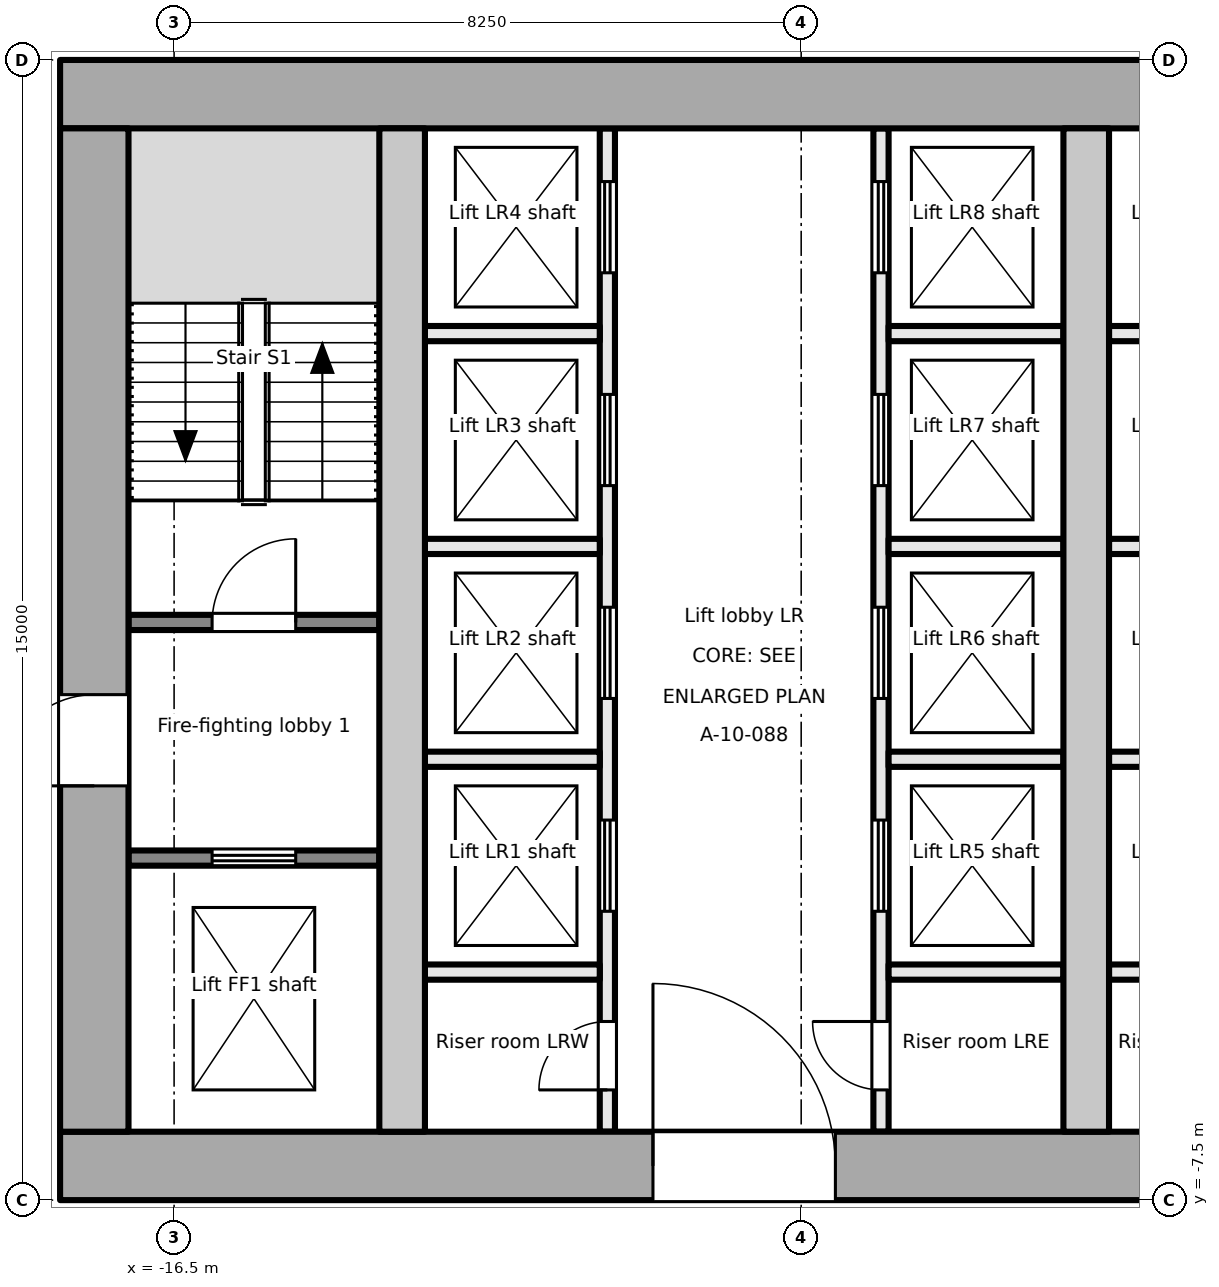
"""IFC4 building model, lengths in metres.
Left out: names, types, materials, properties, quantities, classifications, styles, units other than length and angle.
Written with IfcOpenShell. Run it as: python <this file> out.ifc"""

import sys

from ifc_helpers import new_model, si_unit, direction, frame, frame_2d, origin, place, context, subcontext, project, spatial, rectangle, extrude, element, fill, save


model = new_model("IFC4")
c1 = context("Model", 3, precision=1e-05, world=origin(), true_north=direction((0.0, 1.0)))
c2 = subcontext(c1, "Body", "Model", "MODEL_VIEW")
j1 = project(units=[si_unit("LENGTHUNIT", "METRE"), si_unit("PLANEANGLEUNIT", "RADIAN")], contexts=[c1])
p1 = place(None, origin())
s1 = spatial("IfcSite", under=j1, at=p1, CompositionType="ELEMENT")
p2 = place(p1, origin())
s2 = spatial("IfcBuilding", under=s1, at=p2, CompositionType="ELEMENT")
p3 = place(p2, frame((0.0, 0.0, 48.8)))
s3 = spatial("IfcBuildingStorey", under=s2, at=p3, CompositionType="ELEMENT", Elevation=48.8)
p4 = place(p3, frame((-18.0, -7.05, -0.2), z_axis=(0.0, 0.0, 1.0), x_axis=(1.0, 0.0, 0.0)))
e1 = element("IfcWall", 1, at=p4, inside=s3, PredefinedType="SHEAR", context=c2, shape_type="SweptSolid", body=[
    extrude(rectangle(XDim=36.0, YDim=0.9, at=frame_2d((18.0, 0.0))), origin(), (0.0, 0.0, 1.0), 4.1),
])
p5 = place(p4, frame((7.8, 0.0, 0.2)))
e2 = element("IfcOpeningElement", 2, at=p5, cuts=e1, PredefinedType="OPENING", context=c2, shape_type="SweptSolid", body=[
    extrude(rectangle(XDim=2.4, YDim=2.1, at=frame_2d((1.2, 1.05))), frame((0.0, 0.46, 0.0), z_axis=(0.0, -1.0, 0.0), x_axis=(1.0, 0.0, 0.0)), (0.0, 0.0, 1.0), 0.921),
])
p6 = place(p4, frame((17.4, 0.0, 0.2)))
e3 = element("IfcOpeningElement", 3, at=p6, cuts=e1, PredefinedType="OPENING", context=c2, shape_type="SweptSolid", body=[
    extrude(rectangle(XDim=1.2, YDim=2.1, at=frame_2d((0.6, 1.05))), frame((0.0, 0.46, 0.0), z_axis=(0.0, -1.0, 0.0), x_axis=(1.0, 0.0, 0.0)), (0.0, 0.0, 1.0), 0.921),
])
p7 = place(p4, frame((26.1, 0.0, 0.2)))
e4 = element("IfcOpeningElement", 4, at=p7, cuts=e1, PredefinedType="OPENING", context=c2, shape_type="SweptSolid", body=[
    extrude(rectangle(XDim=2.4, YDim=2.1, at=frame_2d((1.2, 1.05))), frame((0.0, 0.46, 0.0), z_axis=(0.0, -1.0, 0.0), x_axis=(1.0, 0.0, 0.0)), (0.0, 0.0, 1.0), 0.921),
])
p8 = place(p3, frame((-18.0, 7.05, -0.2), z_axis=(0.0, 0.0, 1.0), x_axis=(1.0, 0.0, 0.0)))
e5 = element("IfcWall", 5, at=p8, inside=s3, PredefinedType="SHEAR", context=c2, shape_type="SweptSolid", body=[
    extrude(rectangle(XDim=36.0, YDim=0.9, at=frame_2d((18.0, 0.0))), origin(), (0.0, 0.0, 1.0), 4.1),
])
p9 = place(p3, frame((-17.55, -6.6, -0.2), z_axis=(0.0, 0.0, 1.0), x_axis=(0.0, 1.0, 0.0)))
e6 = element("IfcWall", 6, at=p9, inside=s3, PredefinedType="SHEAR", context=c2, shape_type="SweptSolid", body=[
    extrude(rectangle(XDim=13.2, YDim=0.9, at=frame_2d((6.6, 0.0))), origin(), (0.0, 0.0, 1.0), 4.1),
])
p10 = place(p9, frame((4.55, 0.0, 0.2)))
e7 = element("IfcOpeningElement", 7, at=p10, cuts=e6, PredefinedType="OPENING", context=c2, shape_type="SweptSolid", body=[
    extrude(rectangle(XDim=1.2, YDim=2.1, at=frame_2d((0.6, 1.05))), frame((0.0, 0.46, 0.0), z_axis=(0.0, -1.0, 0.0), x_axis=(1.0, 0.0, 0.0)), (0.0, 0.0, 1.0), 0.921),
])
for number, where, z_axis, x_axis in (
    (8, (-13.5, -6.6, -0.2), (0.0, 0.0, 1.0), (0.0, 1.0, 0.0)),
    (9, (-4.5, -6.6, -0.2), (0.0, 0.0, 1.0), (0.0, 1.0, 0.0)),
):
    element("IfcWall", number, at=place(p3, frame(where, z_axis=z_axis, x_axis=x_axis)), inside=s3, PredefinedType="SHEAR", context=c2, shape_type="SweptSolid", body=[
        extrude(rectangle(XDim=13.2, YDim=0.6, at=frame_2d((6.6, 0.0))), origin(), (0.0, 0.0, 1.0), 4.1),
    ])
p11 = place(p3, frame((-17.1, -3.0, 0.0), z_axis=(0.0, 0.0, 1.0), x_axis=(1.0, 0.0, 0.0)))
e10 = element("IfcWall", 10, at=p11, inside=s3, PredefinedType="PARTITIONING", context=c2, shape_type="SweptSolid", body=[
    extrude(rectangle(XDim=3.3, YDim=0.2, at=frame_2d((1.65, 0.0))), origin(), (0.0, 0.0, 1.0), 3.9),
])
p12 = place(p11, frame((1.1, 0.0, 0.0)))
e11 = element("IfcOpeningElement", 11, at=p12, cuts=e10, PredefinedType="OPENING", context=c2, shape_type="SweptSolid", body=[
    extrude(rectangle(XDim=1.1, YDim=2.1, at=frame_2d((0.55, 1.05))), frame((0.0, 0.111, 0.0), z_axis=(0.0, -1.0, 0.0), x_axis=(1.0, 0.0, 0.0)), (0.0, 0.0, 1.0), 0.221),
])
p13 = place(p3, frame((-17.1, 0.1, 0.0), z_axis=(0.0, 0.0, 1.0), x_axis=(1.0, 0.0, 0.0)))
e12 = element("IfcWall", 12, at=p13, inside=s3, PredefinedType="PARTITIONING", context=c2, shape_type="SweptSolid", body=[
    extrude(rectangle(XDim=3.3, YDim=0.2, at=frame_2d((1.65, 0.0))), origin(), (0.0, 0.0, 1.0), 3.9),
])
p14 = place(p13, frame((1.1, 0.0, 0.0)))
e13 = element("IfcOpeningElement", 13, at=p14, cuts=e12, PredefinedType="OPENING", context=c2, shape_type="SweptSolid", body=[
    extrude(rectangle(XDim=1.1, YDim=2.1, at=frame_2d((0.55, 1.05))), frame((0.0, 0.111, 0.0), z_axis=(0.0, -1.0, 0.0), x_axis=(1.0, 0.0, 0.0)), (0.0, 0.0, 1.0), 0.221),
])
p15 = place(p3, frame((-10.8, -6.6, 0.0), z_axis=(0.0, 0.0, 1.0), x_axis=(0.0, 1.0, 0.0)))
e14 = element("IfcWall", 14, at=p15, inside=s3, PredefinedType="PARTITIONING", context=c2, shape_type="SweptSolid", body=[
    extrude(rectangle(XDim=13.2, YDim=0.2, at=frame_2d((6.6, 0.0))), origin(), (0.0, 0.0, 1.0), 3.9),
])
p16 = place(p15, frame((0.55, 0.0, 0.0)))
e15 = element("IfcOpeningElement", 15, at=p16, cuts=e14, PredefinedType="OPENING", context=c2, shape_type="SweptSolid", body=[
    extrude(rectangle(XDim=0.9, YDim=2.1, at=frame_2d((0.45, 1.05))), frame((0.0, 0.111, 0.0), z_axis=(0.0, -1.0, 0.0), x_axis=(1.0, 0.0, 0.0)), (0.0, 0.0, 1.0), 0.221),
])
p17 = place(p15, frame((2.9, 0.0, 0.0)))
e16 = element("IfcOpeningElement", 16, at=p17, cuts=e14, PredefinedType="OPENING", context=c2, shape_type="SweptSolid", body=[
    extrude(rectangle(XDim=1.2, YDim=2.1, at=frame_2d((0.6, 1.05))), frame((0.0, 0.111, 0.0), z_axis=(0.0, -1.0, 0.0), x_axis=(1.0, 0.0, 0.0)), (0.0, 0.0, 1.0), 0.221),
])
p18 = place(p15, frame((5.7, 0.0, 0.0)))
e17 = element("IfcOpeningElement", 17, at=p18, cuts=e14, PredefinedType="OPENING", context=c2, shape_type="SweptSolid", body=[
    extrude(rectangle(XDim=1.2, YDim=2.1, at=frame_2d((0.6, 1.05))), frame((0.0, 0.111, 0.0), z_axis=(0.0, -1.0, 0.0), x_axis=(1.0, 0.0, 0.0)), (0.0, 0.0, 1.0), 0.221),
])
p19 = place(p15, frame((8.5, 0.0, 0.0)))
e18 = element("IfcOpeningElement", 18, at=p19, cuts=e14, PredefinedType="OPENING", context=c2, shape_type="SweptSolid", body=[
    extrude(rectangle(XDim=1.2, YDim=2.1, at=frame_2d((0.6, 1.05))), frame((0.0, 0.111, 0.0), z_axis=(0.0, -1.0, 0.0), x_axis=(1.0, 0.0, 0.0)), (0.0, 0.0, 1.0), 0.221),
])
p20 = place(p15, frame((11.3, 0.0, 0.0)))
e19 = element("IfcOpeningElement", 19, at=p20, cuts=e14, PredefinedType="OPENING", context=c2, shape_type="SweptSolid", body=[
    extrude(rectangle(XDim=1.2, YDim=2.1, at=frame_2d((0.6, 1.05))), frame((0.0, 0.111, 0.0), z_axis=(0.0, -1.0, 0.0), x_axis=(1.0, 0.0, 0.0)), (0.0, 0.0, 1.0), 0.221),
])
p21 = place(p3, frame((-7.2, -6.6, 0.0), z_axis=(0.0, 0.0, 1.0), x_axis=(0.0, 1.0, 0.0)))
e20 = element("IfcWall", 20, at=p21, inside=s3, PredefinedType="PARTITIONING", context=c2, shape_type="SweptSolid", body=[
    extrude(rectangle(XDim=13.2, YDim=0.2, at=frame_2d((6.6, 0.0))), origin(), (0.0, 0.0, 1.0), 3.9),
])
p22 = place(p21, frame((0.55, 0.0, 0.0)))
e21 = element("IfcOpeningElement", 21, at=p22, cuts=e20, PredefinedType="OPENING", context=c2, shape_type="SweptSolid", body=[
    extrude(rectangle(XDim=0.9, YDim=2.1, at=frame_2d((0.45, 1.05))), frame((0.0, 0.111, 0.0), z_axis=(0.0, -1.0, 0.0), x_axis=(1.0, 0.0, 0.0)), (0.0, 0.0, 1.0), 0.221),
])
p23 = place(p21, frame((2.9, 0.0, 0.0)))
e22 = element("IfcOpeningElement", 22, at=p23, cuts=e20, PredefinedType="OPENING", context=c2, shape_type="SweptSolid", body=[
    extrude(rectangle(XDim=1.2, YDim=2.1, at=frame_2d((0.6, 1.05))), frame((0.0, 0.111, 0.0), z_axis=(0.0, -1.0, 0.0), x_axis=(1.0, 0.0, 0.0)), (0.0, 0.0, 1.0), 0.221),
])
p24 = place(p21, frame((5.7, 0.0, 0.0)))
e23 = element("IfcOpeningElement", 23, at=p24, cuts=e20, PredefinedType="OPENING", context=c2, shape_type="SweptSolid", body=[
    extrude(rectangle(XDim=1.2, YDim=2.1, at=frame_2d((0.6, 1.05))), frame((0.0, 0.111, 0.0), z_axis=(0.0, -1.0, 0.0), x_axis=(1.0, 0.0, 0.0)), (0.0, 0.0, 1.0), 0.221),
])
p25 = place(p21, frame((8.5, 0.0, 0.0)))
e24 = element("IfcOpeningElement", 24, at=p25, cuts=e20, PredefinedType="OPENING", context=c2, shape_type="SweptSolid", body=[
    extrude(rectangle(XDim=1.2, YDim=2.1, at=frame_2d((0.6, 1.05))), frame((0.0, 0.111, 0.0), z_axis=(0.0, -1.0, 0.0), x_axis=(1.0, 0.0, 0.0)), (0.0, 0.0, 1.0), 0.221),
])
p26 = place(p21, frame((11.3, 0.0, 0.0)))
e25 = element("IfcOpeningElement", 25, at=p26, cuts=e20, PredefinedType="OPENING", context=c2, shape_type="SweptSolid", body=[
    extrude(rectangle(XDim=1.2, YDim=2.1, at=frame_2d((0.6, 1.05))), frame((0.0, 0.111, 0.0), z_axis=(0.0, -1.0, 0.0), x_axis=(1.0, 0.0, 0.0)), (0.0, 0.0, 1.0), 0.221),
])
for number, where, z_axis, x_axis in (
    (26, (-13.2, -1.7, 0.0), (0.0, 0.0, 1.0), (1.0, 0.0, 0.0)),
    (27, (-13.2, 1.1, 0.0), (0.0, 0.0, 1.0), (1.0, 0.0, 0.0)),
    (28, (-13.2, 3.9, 0.0), (0.0, 0.0, 1.0), (1.0, 0.0, 0.0)),
    (29, (-13.2, -4.5, 0.0), (0.0, 0.0, 1.0), (1.0, 0.0, 0.0)),
    (30, (-7.1, -1.7, 0.0), (0.0, 0.0, 1.0), (1.0, 0.0, 0.0)),
    (31, (-7.1, 1.1, 0.0), (0.0, 0.0, 1.0), (1.0, 0.0, 0.0)),
    (32, (-7.1, 3.9, 0.0), (0.0, 0.0, 1.0), (1.0, 0.0, 0.0)),
    (33, (-7.1, -4.5, 0.0), (0.0, 0.0, 1.0), (1.0, 0.0, 0.0)),
    (34, (-4.2, -1.7, 0.0), (0.0, 0.0, 1.0), (1.0, 0.0, 0.0)),
    (35, (-4.2, 1.1, 0.0), (0.0, 0.0, 1.0), (1.0, 0.0, 0.0)),
    (36, (-4.2, 3.9, 0.0), (0.0, 0.0, 1.0), (1.0, 0.0, 0.0)),
    (37, (-4.2, -4.5, 0.0), (0.0, 0.0, 1.0), (1.0, 0.0, 0.0)),
):
    element("IfcWall", number, at=place(p3, frame(where, z_axis=z_axis, x_axis=x_axis)), inside=s3, PredefinedType="PARTITIONING", context=c2, shape_type="SweptSolid", body=[
        extrude(rectangle(XDim=2.3, YDim=0.2, at=frame_2d((1.15, 0.0))), origin(), (0.0, 0.0, 1.0), 3.9),
    ])
p27 = place(p12, origin())
e38 = element("IfcDoor", 38, at=p27, inside=s3, OperationType="DOUBLE_DOOR_SLIDING", PredefinedType="DOOR", context=c2, shape_type="SweptSolid", body=[
    extrude(rectangle(XDim=1.1, YDim=2.1, at=frame_2d((0.55, 1.05))), frame((0.0, 0.025, 0.0), z_axis=(0.0, -1.0, 0.0), x_axis=(1.0, 0.0, 0.0)), (0.0, 0.0, 1.0), 0.05),
])
fill(e11, e38)
p28 = place(p10, origin())
e39 = element("IfcDoor", 39, at=p28, inside=s3, OperationType="SINGLE_SWING_LEFT", PredefinedType="DOOR", context=c2, shape_type="SweptSolid", body=[
    extrude(rectangle(XDim=1.2, YDim=2.1, at=frame_2d((0.6, 1.05))), frame((0.0, 0.025, 0.0), z_axis=(0.0, -1.0, 0.0), x_axis=(1.0, 0.0, 0.0)), (0.0, 0.0, 1.0), 0.05),
])
fill(e7, e39)
p29 = place(p14, origin())
e40 = element("IfcDoor", 40, at=p29, inside=s3, OperationType="SINGLE_SWING_RIGHT", PredefinedType="DOOR", context=c2, shape_type="SweptSolid", body=[
    extrude(rectangle(XDim=1.1, YDim=2.1, at=frame_2d((0.55, 1.05))), frame((0.0, 0.025, 0.0), z_axis=(0.0, -1.0, 0.0), x_axis=(1.0, 0.0, 0.0)), (0.0, 0.0, 1.0), 0.05),
])
fill(e13, e40)
p30 = place(p16, origin())
e41 = element("IfcDoor", 41, at=p30, inside=s3, OperationType="SINGLE_SWING_LEFT", PredefinedType="DOOR", context=c2, shape_type="SweptSolid", body=[
    extrude(rectangle(XDim=0.9, YDim=2.1, at=frame_2d((0.45, 1.05))), frame((0.0, 0.025, 0.0), z_axis=(0.0, -1.0, 0.0), x_axis=(1.0, 0.0, 0.0)), (0.0, 0.0, 1.0), 0.05),
])
fill(e15, e41)
p31 = place(p17, origin())
e42 = element("IfcDoor", 42, at=p31, inside=s3, OperationType="DOUBLE_DOOR_SLIDING", PredefinedType="DOOR", context=c2, shape_type="SweptSolid", body=[
    extrude(rectangle(XDim=1.2, YDim=2.1, at=frame_2d((0.6, 1.05))), frame((0.0, 0.025, 0.0), z_axis=(0.0, -1.0, 0.0), x_axis=(1.0, 0.0, 0.0)), (0.0, 0.0, 1.0), 0.05),
])
fill(e16, e42)
p32 = place(p18, origin())
e43 = element("IfcDoor", 43, at=p32, inside=s3, OperationType="DOUBLE_DOOR_SLIDING", PredefinedType="DOOR", context=c2, shape_type="SweptSolid", body=[
    extrude(rectangle(XDim=1.2, YDim=2.1, at=frame_2d((0.6, 1.05))), frame((0.0, 0.025, 0.0), z_axis=(0.0, -1.0, 0.0), x_axis=(1.0, 0.0, 0.0)), (0.0, 0.0, 1.0), 0.05),
])
fill(e17, e43)
p33 = place(p19, origin())
e44 = element("IfcDoor", 44, at=p33, inside=s3, OperationType="DOUBLE_DOOR_SLIDING", PredefinedType="DOOR", context=c2, shape_type="SweptSolid", body=[
    extrude(rectangle(XDim=1.2, YDim=2.1, at=frame_2d((0.6, 1.05))), frame((0.0, 0.025, 0.0), z_axis=(0.0, -1.0, 0.0), x_axis=(1.0, 0.0, 0.0)), (0.0, 0.0, 1.0), 0.05),
])
fill(e18, e44)
p34 = place(p20, origin())
e45 = element("IfcDoor", 45, at=p34, inside=s3, OperationType="DOUBLE_DOOR_SLIDING", PredefinedType="DOOR", context=c2, shape_type="SweptSolid", body=[
    extrude(rectangle(XDim=1.2, YDim=2.1, at=frame_2d((0.6, 1.05))), frame((0.0, 0.025, 0.0), z_axis=(0.0, -1.0, 0.0), x_axis=(1.0, 0.0, 0.0)), (0.0, 0.0, 1.0), 0.05),
])
fill(e19, e45)
p35 = place(p22, origin())
e46 = element("IfcDoor", 46, at=p35, inside=s3, OperationType="SINGLE_SWING_RIGHT", PredefinedType="DOOR", context=c2, shape_type="SweptSolid", body=[
    extrude(rectangle(XDim=0.9, YDim=2.1, at=frame_2d((0.45, 1.05))), frame((0.0, 0.025, 0.0), z_axis=(0.0, -1.0, 0.0), x_axis=(1.0, 0.0, 0.0)), (0.0, 0.0, 1.0), 0.05),
])
fill(e21, e46)
p36 = place(p23, origin())
e47 = element("IfcDoor", 47, at=p36, inside=s3, OperationType="DOUBLE_DOOR_SLIDING", PredefinedType="DOOR", context=c2, shape_type="SweptSolid", body=[
    extrude(rectangle(XDim=1.2, YDim=2.1, at=frame_2d((0.6, 1.05))), frame((0.0, 0.025, 0.0), z_axis=(0.0, -1.0, 0.0), x_axis=(1.0, 0.0, 0.0)), (0.0, 0.0, 1.0), 0.05),
])
fill(e22, e47)
p37 = place(p24, origin())
e48 = element("IfcDoor", 48, at=p37, inside=s3, OperationType="DOUBLE_DOOR_SLIDING", PredefinedType="DOOR", context=c2, shape_type="SweptSolid", body=[
    extrude(rectangle(XDim=1.2, YDim=2.1, at=frame_2d((0.6, 1.05))), frame((0.0, 0.025, 0.0), z_axis=(0.0, -1.0, 0.0), x_axis=(1.0, 0.0, 0.0)), (0.0, 0.0, 1.0), 0.05),
])
fill(e23, e48)
p38 = place(p25, origin())
e49 = element("IfcDoor", 49, at=p38, inside=s3, OperationType="DOUBLE_DOOR_SLIDING", PredefinedType="DOOR", context=c2, shape_type="SweptSolid", body=[
    extrude(rectangle(XDim=1.2, YDim=2.1, at=frame_2d((0.6, 1.05))), frame((0.0, 0.025, 0.0), z_axis=(0.0, -1.0, 0.0), x_axis=(1.0, 0.0, 0.0)), (0.0, 0.0, 1.0), 0.05),
])
fill(e24, e49)
p39 = place(p26, origin())
e50 = element("IfcDoor", 50, at=p39, inside=s3, OperationType="DOUBLE_DOOR_SLIDING", PredefinedType="DOOR", context=c2, shape_type="SweptSolid", body=[
    extrude(rectangle(XDim=1.2, YDim=2.1, at=frame_2d((0.6, 1.05))), frame((0.0, 0.025, 0.0), z_axis=(0.0, -1.0, 0.0), x_axis=(1.0, 0.0, 0.0)), (0.0, 0.0, 1.0), 0.05),
])
fill(e25, e50)
p40 = place(p5, origin())
e51 = element("IfcDoor", 51, at=p40, inside=s3, OperationType="DOUBLE_DOOR_DOUBLE_SWING", PredefinedType="DOOR", context=c2, shape_type="SweptSolid", body=[
    extrude(rectangle(XDim=2.4, YDim=2.1, at=frame_2d((1.2, 1.05))), frame((0.0, 0.025, 0.0), z_axis=(0.0, -1.0, 0.0), x_axis=(1.0, 0.0, 0.0)), (0.0, 0.0, 1.0), 0.05),
])
fill(e2, e51)
save(model, sys.argv[1])
